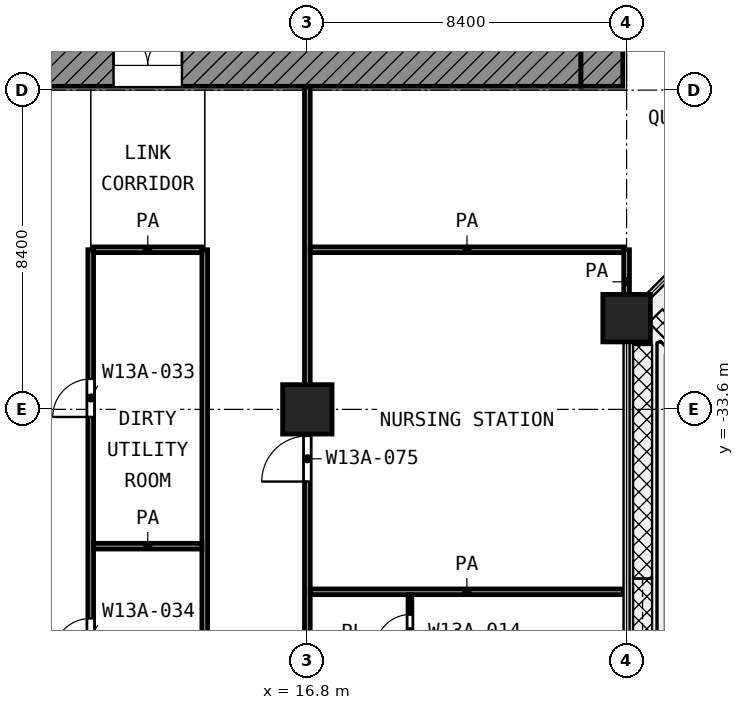
"""IFC4 building model, lengths in metres.
Left out: names, types, materials, properties, quantities, classifications, styles, units other than length and angle.
Written with IfcOpenShell. Run it as: python <this file> out.ifc"""

import sys

from ifc_helpers import new_model, si_unit, direction, frame, frame_2d, origin, origin_2d, place, context, subcontext, project, spatial, rectangle, extrude, element, fill, save


model = new_model("IFC4")
c1 = context("Model", 3, precision=1e-05, world=origin(), true_north=direction((0.0, 1.0)))
c2 = subcontext(c1, "Body", "Model", "MODEL_VIEW")
j1 = project(units=[si_unit("LENGTHUNIT", "METRE"), si_unit("PLANEANGLEUNIT", "RADIAN")], contexts=[c1])
p1 = place(None, origin())
s1 = spatial("IfcSite", under=j1, at=p1, CompositionType="ELEMENT")
p2 = place(p1, origin())
s2 = spatial("IfcBuilding", under=s1, at=p2, CompositionType="ELEMENT")
p3 = place(p2, frame((0.0, 0.0, 60.2)))
s3 = spatial("IfcBuildingStorey", under=s2, at=p3, CompositionType="ELEMENT", Elevation=60.2)
p4 = place(p3, frame((25.2, -31.2, 0.0), z_axis=(0.0, 0.0, 1.0), x_axis=(1.0, 0.0, 0.0)))
e1 = element("IfcColumn", 1, at=p4, inside=s3, PredefinedType="COLUMN", context=c2, shape_type="SweptSolid", body=[
    extrude(rectangle(XDim=1.25, YDim=1.25, at=origin_2d()), origin(), (0.0, 0.0, 1.0), 4.2),
])
p5 = place(p3, frame((16.8, -33.6, 0.0), z_axis=(0.0, 0.0, 1.0), x_axis=(1.0, 0.0, 0.0)))
e2 = element("IfcColumn", 2, at=p5, inside=s3, PredefinedType="COLUMN", context=c2, shape_type="SweptSolid", body=[
    extrude(rectangle(XDim=1.3, YDim=1.3, at=origin_2d()), origin(), (0.0, 0.0, 1.0), 4.2),
])
p6 = place(p3, frame((5.4, -24.55, 0.0), z_axis=(0.0, 0.0, 1.0), x_axis=(1.0, 0.0, 0.0)))
e3 = element("IfcWall", 3, at=p6, inside=s3, PredefinedType="SHEAR", context=c2, shape_type="SweptSolid", body=[
    extrude(rectangle(XDim=18.6, YDim=1.1, at=frame_2d((9.3, 0.0))), origin(), (0.0, 0.0, 1.0), 3.9),
])
p7 = place(p6, frame((6.3, 0.0, 0.0)))
e4 = element("IfcOpeningElement", 4, at=p7, cuts=e3, PredefinedType="OPENING", context=c2, shape_type="SweptSolid", body=[
    extrude(rectangle(XDim=1.8, YDim=2.1, at=frame_2d((0.9, 1.05))), frame((0.0, 0.56, 0.0), z_axis=(0.0, -1.0, 0.0), x_axis=(1.0, 0.0, 0.0)), (0.0, 0.0, 1.0), 1.12),
])
p8 = place(p3, frame((24.55, -25.1, 0.0), z_axis=(0.0, 0.0, 1.0), x_axis=(0.0, 1.0, 0.0)))
e5 = element("IfcWall", 5, at=p8, inside=s3, PredefinedType="SHEAR", context=c2, shape_type="SweptSolid", body=[
    extrude(rectangle(XDim=1.1, YDim=1.1, at=frame_2d((0.55, 0.0))), origin(), (0.0, 0.0, 1.0), 3.9),
])
p9 = place(p3, frame((19.5, -40.5, 0.0), z_axis=(0.0, 0.0, 1.0), x_axis=(0.0, 1.0, 0.0)))
e6 = element("IfcWall", 6, at=p9, inside=s3, PredefinedType="PARTITIONING", context=c2, shape_type="SweptSolid", body=[
    extrude(rectangle(XDim=2.025, YDim=0.1, at=frame_2d((1.012, 0.0))), origin(), (0.0, 0.0, 1.0), 3.9),
])
p10 = place(p9, frame((0.6, 0.0, 0.0)))
e7 = element("IfcOpeningElement", 7, at=p10, cuts=e6, PredefinedType="OPENING", context=c2, shape_type="SweptSolid", body=[
    extrude(rectangle(XDim=0.9, YDim=2.1, at=frame_2d((0.45, 1.05))), frame((0.0, 0.06, 0.0), z_axis=(0.0, -1.0, 0.0), x_axis=(1.0, 0.0, 0.0)), (0.0, 0.0, 1.0), 0.12),
])
p11 = place(p3, frame((16.875, -38.4, 0.0), z_axis=(0.0, 0.0, 1.0), x_axis=(1.0, 0.0, 0.0)))
e8 = element("IfcWall", 8, at=p11, inside=s3, PredefinedType="PARTITIONING", context=c2, shape_type="SweptSolid", body=[
    extrude(rectangle(XDim=8.245, YDim=0.15, at=frame_2d((4.123, 0.0))), origin(), (0.0, 0.0, 1.0), 3.9),
])
for number, where, z_axis, x_axis in (
    (9, (11.175, -37.2, 0.0), (0.0, 0.0, 1.0), (1.0, 0.0, 0.0)),
    (10, (11.175, -29.4, 0.0), (0.0, 0.0, 1.0), (1.0, 0.0, 0.0)),
):
    element("IfcWall", number, at=place(p3, frame(where, z_axis=z_axis, x_axis=x_axis)), inside=s3, PredefinedType="PARTITIONING", context=c2, shape_type="SweptSolid", body=[
        extrude(rectangle(XDim=2.85, YDim=0.15, at=frame_2d((1.425, 0.0))), origin(), (0.0, 0.0, 1.0), 3.9),
    ])
p12 = place(p3, frame((16.875, -29.4, 0.0), z_axis=(0.0, 0.0, 1.0), x_axis=(1.0, 0.0, 0.0)))
e11 = element("IfcWall", 11, at=p12, inside=s3, PredefinedType="PARTITIONING", context=c2, shape_type="SweptSolid", body=[
    extrude(rectangle(XDim=8.25, YDim=0.15, at=frame_2d((4.125, 0.0))), origin(), (0.0, 0.0, 1.0), 3.9),
])
p13 = place(p3, frame((11.1, -58.7, 0.0), z_axis=(0.0, 0.0, 1.0), x_axis=(0.0, 1.0, 0.0)))
e12 = element("IfcWall", 12, at=p13, inside=s3, PredefinedType="PARTITIONING", context=c2, shape_type="SweptSolid", body=[
    extrude(rectangle(XDim=29.3, YDim=0.15, at=frame_2d((14.65, 0.0))), origin(), (0.0, 0.0, 1.0), 3.9),
])
p14 = place(p13, frame((24.9, 0.0, 0.0)))
e13 = element("IfcOpeningElement", 13, at=p14, cuts=e12, PredefinedType="OPENING", context=c2, shape_type="SweptSolid", body=[
    extrude(rectangle(XDim=1.0, YDim=2.1, at=frame_2d((0.5, 1.05))), frame((0.0, 0.085, 0.0), z_axis=(0.0, -1.0, 0.0), x_axis=(1.0, 0.0, 0.0)), (0.0, 0.0, 1.0), 0.17),
])
p15 = place(p13, frame((18.6, 0.0, 0.0)))
e14 = element("IfcOpeningElement", 14, at=p15, cuts=e12, PredefinedType="OPENING", context=c2, shape_type="SweptSolid", body=[
    extrude(rectangle(XDim=1.0, YDim=2.1, at=frame_2d((0.5, 1.05))), frame((0.0, 0.085, 0.0), z_axis=(0.0, -1.0, 0.0), x_axis=(1.0, 0.0, 0.0)), (0.0, 0.0, 1.0), 0.17),
])
p16 = place(p13, frame((14.1, 0.0, 0.0)))
e15 = element("IfcOpeningElement", 15, at=p16, cuts=e12, PredefinedType="OPENING", context=c2, shape_type="SweptSolid", body=[
    extrude(rectangle(XDim=1.0, YDim=2.1, at=frame_2d((0.5, 1.05))), frame((0.0, 0.085, 0.0), z_axis=(0.0, -1.0, 0.0), x_axis=(1.0, 0.0, 0.0)), (0.0, 0.0, 1.0), 0.17),
])
p17 = place(p13, frame((1.2, 0.0, 0.0)))
e16 = element("IfcOpeningElement", 16, at=p17, cuts=e12, PredefinedType="OPENING", context=c2, shape_type="SweptSolid", body=[
    extrude(rectangle(XDim=1.0, YDim=2.1, at=frame_2d((0.5, 1.05))), frame((0.0, 0.085, 0.0), z_axis=(0.0, -1.0, 0.0), x_axis=(1.0, 0.0, 0.0)), (0.0, 0.0, 1.0), 0.17),
])
p18 = place(p3, frame((14.1, -58.7, 0.0), z_axis=(0.0, 0.0, 1.0), x_axis=(0.0, 1.0, 0.0)))
e17 = element("IfcWall", 17, at=p18, inside=s3, PredefinedType="PARTITIONING", context=c2, shape_type="SweptSolid", body=[
    extrude(rectangle(XDim=29.3, YDim=0.15, at=frame_2d((14.65, 0.0))), origin(), (0.0, 0.0, 1.0), 3.9),
])
p19 = place(p18, frame((7.5, 0.0, 0.0)))
e18 = element("IfcOpeningElement", 18, at=p19, cuts=e17, PredefinedType="OPENING", context=c2, shape_type="SweptSolid", body=[
    extrude(rectangle(XDim=1.0, YDim=2.1, at=frame_2d((0.5, 1.05))), frame((0.0, 0.085, 0.0), z_axis=(0.0, -1.0, 0.0), x_axis=(1.0, 0.0, 0.0)), (0.0, 0.0, 1.0), 0.17),
])
p20 = place(p3, frame((16.8, -58.798, 0.0), z_axis=(0.0, 0.0, 1.0), x_axis=(0.0, 1.0, 0.0)))
e19 = element("IfcWall", 19, at=p20, inside=s3, PredefinedType="PARTITIONING", context=c2, shape_type="SweptSolid", body=[
    extrude(rectangle(XDim=33.698, YDim=0.15, at=frame_2d((16.849, 0.0))), origin(), (0.0, 0.0, 1.0), 3.9),
])
p21 = place(p20, frame((23.298, 0.0, 0.0)))
e20 = element("IfcOpeningElement", 20, at=p21, cuts=e19, PredefinedType="OPENING", context=c2, shape_type="SweptSolid", body=[
    extrude(rectangle(XDim=1.2, YDim=2.1, at=frame_2d((0.6, 1.05))), frame((0.0, 0.085, 0.0), z_axis=(0.0, -1.0, 0.0), x_axis=(1.0, 0.0, 0.0)), (0.0, 0.0, 1.0), 0.17),
])
p22 = place(p20, frame((15.223, 0.0, 0.0)))
e21 = element("IfcOpeningElement", 21, at=p22, cuts=e19, PredefinedType="OPENING", context=c2, shape_type="SweptSolid", body=[
    extrude(rectangle(XDim=0.9, YDim=2.1, at=frame_2d((0.45, 1.05))), frame((0.0, 0.085, 0.0), z_axis=(0.0, -1.0, 0.0), x_axis=(1.0, 0.0, 0.0)), (0.0, 0.0, 1.0), 0.17),
])
p23 = place(p20, frame((13.348, 0.0, 0.0)))
e22 = element("IfcOpeningElement", 22, at=p23, cuts=e19, PredefinedType="OPENING", context=c2, shape_type="SweptSolid", body=[
    extrude(rectangle(XDim=1.2, YDim=2.1, at=frame_2d((0.6, 1.05))), frame((0.0, 0.085, 0.0), z_axis=(0.0, -1.0, 0.0), x_axis=(1.0, 0.0, 0.0)), (0.0, 0.0, 1.0), 0.17),
])
p24 = place(p20, frame((9.098, 0.0, 0.0)))
e23 = element("IfcOpeningElement", 23, at=p24, cuts=e19, PredefinedType="OPENING", context=c2, shape_type="SweptSolid", body=[
    extrude(rectangle(XDim=1.2, YDim=2.1, at=frame_2d((0.6, 1.05))), frame((0.0, 0.085, 0.0), z_axis=(0.0, -1.0, 0.0), x_axis=(1.0, 0.0, 0.0)), (0.0, 0.0, 1.0), 0.17),
])
p25 = place(p20, frame((6.498, 0.0, 0.0)))
e24 = element("IfcOpeningElement", 24, at=p25, cuts=e19, PredefinedType="OPENING", context=c2, shape_type="SweptSolid", body=[
    extrude(rectangle(XDim=1.2, YDim=2.1, at=frame_2d((0.6, 1.05))), frame((0.0, 0.085, 0.0), z_axis=(0.0, -1.0, 0.0), x_axis=(1.0, 0.0, 0.0)), (0.0, 0.0, 1.0), 0.17),
])
p26 = place(p20, frame((4.348, 0.0, 0.0)))
e25 = element("IfcOpeningElement", 25, at=p26, cuts=e19, PredefinedType="OPENING", context=c2, shape_type="SweptSolid", body=[
    extrude(rectangle(XDim=1.2, YDim=2.1, at=frame_2d((0.6, 1.05))), frame((0.0, 0.085, 0.0), z_axis=(0.0, -1.0, 0.0), x_axis=(1.0, 0.0, 0.0)), (0.0, 0.0, 1.0), 0.17),
])
p27 = place(p20, frame((0.698, 0.0, 0.0)))
e26 = element("IfcOpeningElement", 26, at=p27, cuts=e19, PredefinedType="OPENING", context=c2, shape_type="SweptSolid", body=[
    extrude(rectangle(XDim=0.9, YDim=2.1, at=frame_2d((0.45, 1.05))), frame((0.0, 0.085, 0.0), z_axis=(0.0, -1.0, 0.0), x_axis=(1.0, 0.0, 0.0)), (0.0, 0.0, 1.0), 0.17),
])
p28 = place(p3, frame((25.2, -31.087, 0.0), z_axis=(0.0, 0.0, 1.0), x_axis=(0.0, 1.0, 0.0)))
e27 = element("IfcWall", 27, at=p28, inside=s3, PredefinedType="PARTITIONING", context=c2, shape_type="SweptSolid", body=[
    extrude(rectangle(XDim=1.687, YDim=0.15, at=frame_2d((0.844, 0.0))), origin(), (0.0, 0.0, 1.0), 3.9),
])
p29 = place(p7, origin())
e28 = element("IfcDoor", 28, at=p29, inside=s3, OperationType="DOUBLE_DOOR_SINGLE_SWING", PredefinedType="DOOR", context=c2, shape_type="SweptSolid", body=[
    extrude(rectangle(XDim=1.8, YDim=2.1, at=frame_2d((0.9, 1.05))), frame((0.0, 0.025, 0.0), z_axis=(0.0, -1.0, 0.0), x_axis=(1.0, 0.0, 0.0)), (0.0, 0.0, 1.0), 0.05),
])
fill(e4, e28)
p30 = place(p14, origin())
e29 = element("IfcDoor", 29, at=p30, inside=s3, OperationType="SINGLE_SWING_LEFT", PredefinedType="DOOR", context=c2, shape_type="SweptSolid", body=[
    extrude(rectangle(XDim=1.0, YDim=2.1, at=frame_2d((0.5, 1.05))), frame((0.0, 0.025, 0.0), z_axis=(0.0, -1.0, 0.0), x_axis=(1.0, 0.0, 0.0)), (0.0, 0.0, 1.0), 0.05),
])
fill(e13, e29)
p31 = place(p15, origin())
e30 = element("IfcDoor", 30, at=p31, inside=s3, OperationType="SINGLE_SWING_LEFT", PredefinedType="DOOR", context=c2, shape_type="SweptSolid", body=[
    extrude(rectangle(XDim=1.0, YDim=2.1, at=frame_2d((0.5, 1.05))), frame((0.0, 0.025, 0.0), z_axis=(0.0, -1.0, 0.0), x_axis=(1.0, 0.0, 0.0)), (0.0, 0.0, 1.0), 0.05),
])
fill(e14, e30)
p32 = place(p21, origin())
e31 = element("IfcDoor", 31, at=p32, inside=s3, OperationType="SINGLE_SWING_LEFT", PredefinedType="DOOR", context=c2, shape_type="SweptSolid", body=[
    extrude(rectangle(XDim=1.2, YDim=2.1, at=frame_2d((0.6, 1.05))), frame((0.0, 0.025, 0.0), z_axis=(0.0, -1.0, 0.0), x_axis=(1.0, 0.0, 0.0)), (0.0, 0.0, 1.0), 0.05),
])
fill(e20, e31)
p33 = place(p10, origin())
e32 = element("IfcDoor", 32, at=p33, inside=s3, OperationType="SINGLE_SWING_LEFT", PredefinedType="DOOR", context=c2, shape_type="SweptSolid", body=[
    extrude(rectangle(XDim=0.9, YDim=2.1, at=frame_2d((0.45, 1.05))), frame((0.0, 0.025, 0.0), z_axis=(0.0, -1.0, 0.0), x_axis=(1.0, 0.0, 0.0)), (0.0, 0.0, 1.0), 0.05),
])
fill(e7, e32)
save(model, sys.argv[1])
